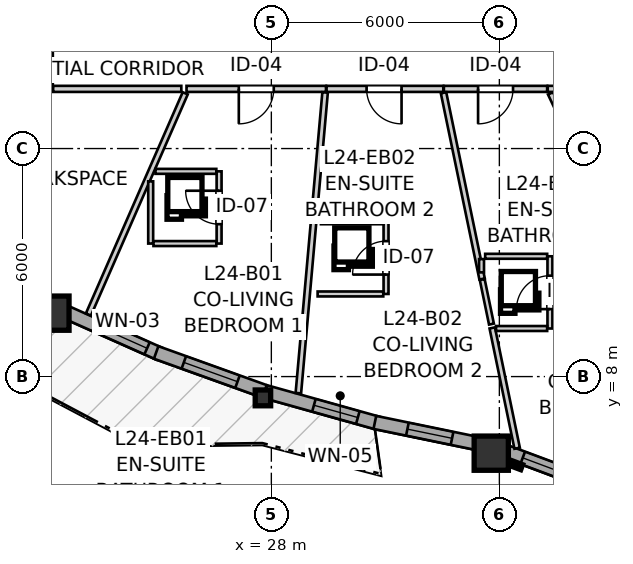
"""IFC4 building model, lengths in metres.
Left out: names, types, materials, properties, quantities, classifications, styles, units other than length and angle.
Written with IfcOpenShell. Run it as: python <this file> out.ifc"""

import sys

from ifc_helpers import new_model, si_unit, direction, frame, frame_2d, origin, origin_2d, place, context, subcontext, project, spatial, rectangle, i_section, extrude, source, transform, mapped, element, fill, save


model = new_model("IFC4")
c1 = context("Model", 3, precision=1e-05, world=origin(), true_north=direction((0.0, 1.0)))
c2 = subcontext(c1, "Body", "Model", "MODEL_VIEW")
j1 = project(units=[si_unit("LENGTHUNIT", "METRE"), si_unit("PLANEANGLEUNIT", "RADIAN")], contexts=[c1])
p1 = place(None, origin())
s1 = spatial("IfcSite", under=j1, at=p1, CompositionType="ELEMENT")
p2 = place(p1, origin())
s2 = spatial("IfcBuilding", under=s1, at=p2, CompositionType="ELEMENT")
p3 = place(p2, frame((0.0, 0.0, 83.2)))
s3 = spatial("IfcBuildingStorey", under=s2, at=p3, CompositionType="ELEMENT", Elevation=83.2)
m1 = source(origin(), c2, "Body", "SweptSolid", [
    extrude(rectangle(XDim=0.9, YDim=0.9, at=origin_2d()), origin(), (0.0, 0.0, 1.0), 2.935),
])
p4 = place(p3, frame((22.227, 9.669, 0.0), z_axis=(0.0, 0.0, 1.0), x_axis=(1.0, 0.0, 0.0)))
e1 = element("IfcColumn", 1, at=p4, inside=s3, PredefinedType="COLUMN", context=c2, shape_type="MappedRepresentation", body=[
    mapped(m1, transform((0.0, 0.0, 0.0), x_axis=(1.0, 0.0, 0.0), y_axis=(0.0, 1.0, 0.0), z_axis=(0.0, 0.0, 1.0), scale=1.0)),
])
m2 = source(origin(), c2, "Body", "SweptSolid", [
    extrude(i_section(OverallWidth=0.406, OverallDepth=0.416, WebThickness=0.027, FlangeThickness=0.044, FilletRadius=0.015, at=origin_2d()), origin(), (0.0, 0.0, 1.0), 2.935),
])
p5 = place(p3, frame((27.779, 7.439, 0.0), z_axis=(0.0, 0.0, 1.0), x_axis=(1.0, 0.0, 0.0)))
e2 = element("IfcColumn", 2, at=p5, inside=s3, PredefinedType="PILASTER", context=c2, shape_type="MappedRepresentation", body=[
    mapped(m2, transform((0.0, 0.0, 0.0), x_axis=(1.0, 0.0, 0.0), y_axis=(0.0, 1.0, 0.0), z_axis=(0.0, 0.0, 1.0), scale=1.0)),
])
p6 = place(p3, frame((33.787, 5.985, 0.0), z_axis=(0.0, 0.0, 1.0), x_axis=(1.0, 0.0, 0.0)))
e3 = element("IfcColumn", 3, at=p6, inside=s3, PredefinedType="COLUMN", context=c2, shape_type="MappedRepresentation", body=[
    mapped(m1, transform((0.0, 0.0, 0.0), x_axis=(1.0, 0.0, 0.0), y_axis=(0.0, 1.0, 0.0), z_axis=(0.0, 0.0, 1.0), scale=1.0)),
])
p7 = place(p3, frame((22.503, 9.737, 0.0), z_axis=(0.0, 0.0, 1.0), x_axis=(0.913443049169, -0.406966578388, 0.0)))
e4 = element("IfcWall", 4, at=p7, inside=s3, PredefinedType="SOLIDWALL", context=c2, shape_type="SweptSolid", body=[
    extrude(rectangle(XDim=2.79, YDim=0.35, at=frame_2d((1.395, 0.0))), origin(), (0.0, 0.0, 1.0), 2.465),
])
p8 = place(p7, frame((0.938, 0.0, 0.82)))
e5 = element("IfcOpeningElement", 5, at=p8, cuts=e4, PredefinedType="OPENING", context=c2, shape_type="SweptSolid", body=[
    extrude(rectangle(XDim=1.5, YDim=1.45, at=frame_2d((0.75, 0.725))), frame((0.0, 0.185, 0.0), z_axis=(0.0, -1.0, 0.0), x_axis=(1.0, 0.0, 0.0)), (0.0, 0.0, 1.0), 0.37),
])
p9 = place(p3, frame((24.969, 8.635, 0.0), z_axis=(0.0, 0.0, 1.0), x_axis=(0.941099972293, -0.338128440315, 0.0)))
e6 = element("IfcWall", 6, at=p9, inside=s3, PredefinedType="SOLIDWALL", context=c2, shape_type="SweptSolid", body=[
    extrude(rectangle(XDim=3.028, YDim=0.35, at=frame_2d((1.514, 0.0))), origin(), (0.0, 0.0, 1.0), 2.465),
])
p10 = place(p9, frame((0.774, 0.0, 0.82)))
e7 = element("IfcOpeningElement", 7, at=p10, cuts=e6, PredefinedType="OPENING", context=c2, shape_type="SweptSolid", body=[
    extrude(rectangle(XDim=1.5, YDim=1.45, at=frame_2d((0.75, 0.725))), frame((0.0, 0.185, 0.0), z_axis=(0.0, -1.0, 0.0), x_axis=(1.0, 0.0, 0.0)), (0.0, 0.0, 1.0), 0.37),
])
p11 = place(p3, frame((27.845, 7.603, 0.0), z_axis=(0.0, 0.0, 1.0), x_axis=(0.963041412051, -0.269353371382, 0.0)))
e8 = element("IfcWall", 8, at=p11, inside=s3, PredefinedType="SOLIDWALL", context=c2, shape_type="SweptSolid", body=[
    extrude(rectangle(XDim=3.078, YDim=0.35, at=frame_2d((1.539, 0.0))), origin(), (0.0, 0.0, 1.0), 2.465),
])
p12 = place(p11, frame((1.324, 0.0, 0.82)))
e9 = element("IfcOpeningElement", 9, at=p12, cuts=e8, PredefinedType="OPENING", context=c2, shape_type="SweptSolid", body=[
    extrude(rectangle(XDim=1.2, YDim=1.45, at=frame_2d((0.6, 0.725))), frame((0.0, 0.185, 0.0), z_axis=(0.0, -1.0, 0.0), x_axis=(1.0, 0.0, 0.0)), (0.0, 0.0, 1.0), 0.37),
])
p13 = place(p3, frame((30.724, 6.794, 0.0), z_axis=(0.0, 0.0, 1.0), x_axis=(0.979439663571, -0.201737317878, 0.0)))
e10 = element("IfcWall", 10, at=p13, inside=s3, PredefinedType="SOLIDWALL", context=c2, shape_type="SweptSolid", body=[
    extrude(rectangle(XDim=2.938, YDim=0.35, at=frame_2d((1.469, 0.0))), origin(), (0.0, 0.0, 1.0), 2.465),
])
p14 = place(p13, frame((0.874, 0.0, 0.82)))
e11 = element("IfcOpeningElement", 11, at=p14, cuts=e10, PredefinedType="OPENING", context=c2, shape_type="SweptSolid", body=[
    extrude(rectangle(XDim=1.2, YDim=1.45, at=frame_2d((0.6, 0.725))), frame((0.0, 0.185, 0.0), z_axis=(0.0, -1.0, 0.0), x_axis=(1.0, 0.0, 0.0)), (0.0, 0.0, 1.0), 0.37),
])
p15 = place(p3, frame((34.059, 6.07, 0.0), z_axis=(0.0, 0.0, 1.0), x_axis=(0.936803747811, -0.349855310219, 0.0)))
e12 = element("IfcWall", 12, at=p15, inside=s3, PredefinedType="SOLIDWALL", context=c2, shape_type="SweptSolid", body=[
    extrude(rectangle(XDim=1.836, YDim=0.35, at=frame_2d((0.918, 0.0))), origin(), (0.0, 0.0, 1.0), 2.465),
])
p16 = place(p15, frame((0.593, 0.0, 0.82)))
e13 = element("IfcOpeningElement", 13, at=p16, cuts=e12, PredefinedType="OPENING", context=c2, shape_type="SweptSolid", body=[
    extrude(rectangle(XDim=0.95, YDim=1.35, at=frame_2d((0.475, 0.675))), frame((0.0, 0.185, 0.0), z_axis=(0.0, -1.0, 0.0), x_axis=(1.0, 0.0, 0.0)), (0.0, 0.0, 1.0), 0.37),
])
p17 = place(p3, frame((22.17, 15.57, 0.0), z_axis=(0.0, 0.0, 1.0), x_axis=(0.0, 1.0, 0.0)))
e14 = element("IfcWall", 14, at=p17, inside=s3, PredefinedType="PARTITIONING", context=c2, shape_type="SweptSolid", body=[
    extrude(rectangle(XDim=5.543, YDim=0.16, at=frame_2d((2.771, 0.0))), origin(), (0.0, 0.0, 1.0), 2.935),
])
p18 = place(p17, frame((2.283, 0.0, 0.0)))
e15 = element("IfcOpeningElement", 15, at=p18, cuts=e14, PredefinedType="OPENING", context=c2, shape_type="SweptSolid", body=[
    extrude(rectangle(XDim=0.96, YDim=2.1, at=frame_2d((0.48, 1.05))), frame((0.0, 0.09, 0.0), z_axis=(0.0, -1.0, 0.0), x_axis=(1.0, 0.0, 0.0)), (0.0, 0.0, 1.0), 0.18),
])
p19 = place(p3, frame((29.438, 15.57, 0.0), z_axis=(0.0, 0.0, 1.0), x_axis=(-1.0, 0.0, 0.0)))
e16 = element("IfcWall", 16, at=p19, inside=s3, PredefinedType="PARTITIONING", context=c2, shape_type="SweptSolid", body=[
    extrude(rectangle(XDim=3.67, YDim=0.16, at=frame_2d((1.835, 0.0))), origin(), (0.0, 0.0, 1.0), 2.935),
])
p20 = place(p19, frame((1.374, 0.0, 0.0)))
e17 = element("IfcOpeningElement", 17, at=p20, cuts=e16, PredefinedType="OPENING", context=c2, shape_type="SweptSolid", body=[
    extrude(rectangle(XDim=0.92, YDim=2.1, at=frame_2d((0.46, 1.05))), frame((0.0, 0.09, 0.0), z_axis=(0.0, -1.0, 0.0), x_axis=(1.0, 0.0, 0.0)), (0.0, 0.0, 1.0), 0.18),
])
p21 = place(p3, frame((38.53, 15.57, 0.0), z_axis=(0.0, 0.0, 1.0), x_axis=(-1.0, 0.0, 0.0)))
e18 = element("IfcWall", 18, at=p21, inside=s3, PredefinedType="PARTITIONING", context=c2, shape_type="SweptSolid", body=[
    extrude(rectangle(XDim=3.257, YDim=0.16, at=frame_2d((1.628, 0.0))), origin(), (0.0, 0.0, 1.0), 2.935),
])
p22 = place(p21, frame((1.16, 0.0, 0.0)))
e19 = element("IfcOpeningElement", 19, at=p22, cuts=e18, PredefinedType="OPENING", context=c2, shape_type="SweptSolid", body=[
    extrude(rectangle(XDim=0.92, YDim=2.1, at=frame_2d((0.46, 1.05))), frame((0.0, 0.09, 0.0), z_axis=(0.0, -1.0, 0.0), x_axis=(1.0, 0.0, 0.0)), (0.0, 0.0, 1.0), 0.18),
])
p23 = place(p3, frame((32.525, 15.57, 0.0), z_axis=(0.0, 0.0, 1.0), x_axis=(-1.0, 0.0, 0.0)))
e20 = element("IfcWall", 20, at=p23, inside=s3, PredefinedType="PARTITIONING", context=c2, shape_type="SweptSolid", body=[
    extrude(rectangle(XDim=3.072, YDim=0.16, at=frame_2d((1.536, 0.0))), origin(), (0.0, 0.0, 1.0), 2.935),
])
p24 = place(p23, frame((1.098, 0.0, 0.0)))
e21 = element("IfcOpeningElement", 21, at=p24, cuts=e20, PredefinedType="OPENING", context=c2, shape_type="SweptSolid", body=[
    extrude(rectangle(XDim=0.92, YDim=2.1, at=frame_2d((0.46, 1.05))), frame((0.0, 0.09, 0.0), z_axis=(0.0, -1.0, 0.0), x_axis=(1.0, 0.0, 0.0)), (0.0, 0.0, 1.0), 0.18),
])
p25 = place(p3, frame((35.258, 15.57, 0.0), z_axis=(0.0, 0.0, 1.0), x_axis=(-1.0, 0.0, 0.0)))
e22 = element("IfcWall", 22, at=p25, inside=s3, PredefinedType="PARTITIONING", context=c2, shape_type="SweptSolid", body=[
    extrude(rectangle(XDim=2.718, YDim=0.16, at=frame_2d((1.359, 0.0))), origin(), (0.0, 0.0, 1.0), 2.935),
])
p26 = place(p25, frame((0.898, 0.0, 0.0)))
e23 = element("IfcOpeningElement", 23, at=p26, cuts=e22, PredefinedType="OPENING", context=c2, shape_type="SweptSolid", body=[
    extrude(rectangle(XDim=0.92, YDim=2.1, at=frame_2d((0.46, 1.05))), frame((0.0, 0.09, 0.0), z_axis=(0.0, -1.0, 0.0), x_axis=(1.0, 0.0, 0.0)), (0.0, 0.0, 1.0), 0.18),
])
p27 = place(p3, frame((26.625, 11.5, 0.0), z_axis=(0.0, 0.0, 1.0), x_axis=(0.0, 1.0, 0.0)))
e24 = element("IfcWall", 24, at=p27, inside=s3, PredefinedType="PARTITIONING", context=c2, shape_type="SweptSolid", body=[
    extrude(rectangle(XDim=1.9, YDim=0.13, at=frame_2d((0.95, 0.0))), origin(), (0.0, 0.0, 1.0), 2.935),
])
p28 = place(p27, frame((0.51, 0.0, 0.0)))
e25 = element("IfcOpeningElement", 25, at=p28, cuts=e24, PredefinedType="OPENING", context=c2, shape_type="SweptSolid", body=[
    extrude(rectangle(XDim=0.88, YDim=2.05, at=frame_2d((0.44, 1.025))), frame((0.0, 0.075, 0.0), z_axis=(0.0, -1.0, 0.0), x_axis=(1.0, 0.0, 0.0)), (0.0, 0.0, 1.0), 0.15),
])
p29 = place(p3, frame((31.018, 10.174, 0.0), z_axis=(0.0, 0.0, 1.0), x_axis=(0.0, 1.0, 0.0)))
e26 = element("IfcWall", 26, at=p29, inside=s3, PredefinedType="PARTITIONING", context=c2, shape_type="SweptSolid", body=[
    extrude(rectangle(XDim=1.9, YDim=0.13, at=frame_2d((0.95, 0.0))), origin(), (0.0, 0.0, 1.0), 2.935),
])
p30 = place(p29, frame((0.51, 0.0, 0.0)))
e27 = element("IfcOpeningElement", 27, at=p30, cuts=e26, PredefinedType="OPENING", context=c2, shape_type="SweptSolid", body=[
    extrude(rectangle(XDim=0.88, YDim=2.05, at=frame_2d((0.44, 1.025))), frame((0.0, 0.075, 0.0), z_axis=(0.0, -1.0, 0.0), x_axis=(1.0, 0.0, 0.0)), (0.0, 0.0, 1.0), 0.15),
])
p31 = place(p3, frame((35.331, 9.265, 0.0), z_axis=(0.0, 0.0, 1.0), x_axis=(0.0, 1.0, 0.0)))
e28 = element("IfcWall", 28, at=p31, inside=s3, PredefinedType="PARTITIONING", context=c2, shape_type="SweptSolid", body=[
    extrude(rectangle(XDim=1.9, YDim=0.13, at=frame_2d((0.95, 0.0))), origin(), (0.0, 0.0, 1.0), 2.935),
])
p32 = place(p31, frame((0.51, 0.0, 0.0)))
e29 = element("IfcOpeningElement", 29, at=p32, cuts=e28, PredefinedType="OPENING", context=c2, shape_type="SweptSolid", body=[
    extrude(rectangle(XDim=0.88, YDim=2.05, at=frame_2d((0.44, 1.025))), frame((0.0, 0.075, 0.0), z_axis=(0.0, -1.0, 0.0), x_axis=(1.0, 0.0, 0.0)), (0.0, 0.0, 1.0), 0.15),
])
p33 = place(p3, frame((28.711, 7.564, 0.0), z_axis=(0.0, 0.0, 1.0), x_axis=(0.088615013812, 0.996065951294, 0.0)))
e30 = element("IfcWall", 30, at=p33, inside=s3, PredefinedType="PARTITIONING", context=c2, shape_type="SweptSolid", body=[
    extrude(rectangle(XDim=7.943, YDim=0.145, at=frame_2d((3.971, 0.0))), origin(), (0.0, 0.0, 1.0), 2.935),
])
p34 = place(p3, frame((23.186, 9.634, 0.0), z_axis=(0.0, 0.0, 1.0), x_axis=(0.400994208685, 0.916080588486, 0.0)))
e31 = element("IfcWall", 31, at=p34, inside=s3, PredefinedType="PARTITIONING", context=c2, shape_type="SweptSolid", body=[
    extrude(rectangle(XDim=6.353, YDim=0.145, at=frame_2d((3.177, 0.0))), origin(), (0.0, 0.0, 1.0), 2.935),
])
p35 = place(p3, frame((32.531, 15.468, 0.0), z_axis=(0.0, 0.0, 1.0), x_axis=(0.202792769077, -0.979221677053, 0.0)))
e32 = element("IfcWall", 32, at=p35, inside=s3, PredefinedType="PARTITIONING", context=c2, shape_type="SweptSolid", body=[
    extrude(rectangle(XDim=5.003, YDim=0.145, at=frame_2d((2.502, 0.0))), origin(), (0.0, 0.0, 1.0), 2.935),
])
p36 = place(p3, frame((35.346, 15.452, 0.0), z_axis=(0.0, 0.0, 1.0), x_axis=(0.428023015228, -0.903767834366, 0.0)))
e33 = element("IfcWall", 33, at=p36, inside=s3, PredefinedType="PARTITIONING", context=c2, shape_type="SweptSolid", body=[
    extrude(rectangle(XDim=4.64, YDim=0.145, at=frame_2d((2.32, 0.0))), origin(), (0.0, 0.0, 1.0), 2.935),
])
p37 = place(p3, frame((22.258, 15.57, 0.0), z_axis=(0.0, 0.0, 1.0), x_axis=(1.0, 0.0, 0.0)))
e34 = element("IfcWall", 34, at=p37, inside=s3, PredefinedType="PARTITIONING", context=c2, shape_type="SweptSolid", body=[
    extrude(rectangle(XDim=3.373, YDim=0.16, at=frame_2d((1.687, 0.0))), origin(), (0.0, 0.0, 1.0), 2.935),
])
p38 = place(p3, frame((33.813, 9.28, 0.0), z_axis=(0.0, 0.0, 1.0), x_axis=(0.202648062782, -0.979251633979, 0.0)))
e35 = element("IfcWall", 35, at=p38, inside=s3, PredefinedType="PARTITIONING", context=c2, shape_type="SweptSolid", body=[
    extrude(rectangle(XDim=3.232, YDim=0.145, at=frame_2d((1.616, 0.0))), origin(), (0.0, 0.0, 1.0), 2.935),
])
p39 = place(p3, frame((24.825, 11.5, 0.0), z_axis=(0.0, 0.0, 1.0), x_axis=(0.0, 1.0, 0.0)))
e36 = element("IfcWall", 36, at=p39, inside=s3, PredefinedType="PARTITIONING", context=c2, shape_type="SweptSolid", body=[
    extrude(rectangle(XDim=1.637, YDim=0.13, at=frame_2d((0.818, 0.0))), origin(), (0.0, 0.0, 1.0), 2.935),
])
p40 = place(p3, frame((33.626, 11.165, 0.0), z_axis=(0.0, 0.0, 1.0), x_axis=(1.0, 0.0, 0.0)))
e37 = element("IfcWall", 37, at=p40, inside=s3, PredefinedType="PARTITIONING", context=c2, shape_type="SweptSolid", body=[
    extrude(rectangle(XDim=1.632, YDim=0.13, at=frame_2d((0.816, 0.0))), origin(), (0.0, 0.0, 1.0), 2.935),
])
p41 = place(p3, frame((24.898, 11.5, 0.0), z_axis=(0.0, 0.0, 1.0), x_axis=(1.0, 0.0, 0.0)))
e38 = element("IfcWall", 38, at=p41, inside=s3, PredefinedType="PARTITIONING", context=c2, shape_type="SweptSolid", body=[
    extrude(rectangle(XDim=1.654, YDim=0.13, at=frame_2d((0.827, 0.0))), origin(), (0.0, 0.0, 1.0), 2.543),
])
p42 = place(p3, frame((29.305, 12.074, 0.0), z_axis=(0.0, 0.0, 1.0), x_axis=(1.0, 0.0, 0.0)))
e39 = element("IfcWall", 39, at=p42, inside=s3, PredefinedType="PARTITIONING", context=c2, shape_type="SweptSolid", body=[
    extrude(rectangle(XDim=1.64, YDim=0.13, at=frame_2d((0.82, 0.0))), origin(), (0.0, 0.0, 1.0), 2.935),
])
p43 = place(p3, frame((29.218, 10.174, 0.0), z_axis=(0.0, 0.0, 1.0), x_axis=(1.0, 0.0, 0.0)))
e40 = element("IfcWall", 40, at=p43, inside=s3, PredefinedType="PARTITIONING", context=c2, shape_type="SweptSolid", body=[
    extrude(rectangle(XDim=1.727, YDim=0.13, at=frame_2d((0.864, 0.0))), origin(), (0.0, 0.0, 1.0), 2.543),
])
p44 = place(p3, frame((24.951, 13.4, 0.0), z_axis=(0.0, 0.0, 1.0), x_axis=(1.0, 0.0, 0.0)))
e41 = element("IfcWall", 41, at=p44, inside=s3, PredefinedType="PARTITIONING", context=c2, shape_type="SweptSolid", body=[
    extrude(rectangle(XDim=1.601, YDim=0.13, at=frame_2d((0.801, 0.0))), origin(), (0.0, 0.0, 1.0), 2.935),
])
p45 = place(p3, frame((33.912, 9.265, 0.0), z_axis=(0.0, 0.0, 1.0), x_axis=(1.0, 0.0, 0.0)))
e42 = element("IfcWall", 42, at=p45, inside=s3, PredefinedType="PARTITIONING", context=c2, shape_type="SweptSolid", body=[
    extrude(rectangle(XDim=1.346, YDim=0.13, at=frame_2d((0.673, 0.0))), origin(), (0.0, 0.0, 1.0), 2.935),
])
p46 = place(p3, frame((33.549, 10.553, 0.0), z_axis=(0.0, 0.0, 1.0), x_axis=(0.202855035592, -0.97920877985, 0.0)))
e43 = element("IfcWall", 43, at=p46, inside=s3, PredefinedType="PARTITIONING", context=c2, shape_type="SweptSolid", body=[
    extrude(rectangle(XDim=1.198, YDim=0.13, at=frame_2d((0.599, 0.0))), origin(), (0.0, 0.0, 1.0), 2.935),
])
p47 = place(p3, frame((33.531, 10.742, 0.0), z_axis=(0.0, 0.0, 1.0), x_axis=(0.0, 1.0, 0.0)))
e44 = element("IfcWall", 44, at=p47, inside=s3, PredefinedType="PARTITIONING", context=c2, shape_type="SweptSolid", body=[
    extrude(rectangle(XDim=0.35, YDim=0.13, at=frame_2d((0.175, 0.0))), origin(), (0.0, 0.0, 1.0), 2.935),
])
m3 = source(origin(), c2, "Body", "SweptSolid", [
    extrude(rectangle(XDim=1.5, YDim=1.45, at=frame_2d((0.75, 0.725))), frame((0.0, 0.03, 0.0), z_axis=(0.0, -1.0, 0.0), x_axis=(1.0, 0.0, 0.0)), (0.0, 0.0, 1.0), 0.06),
])
p48 = place(p8, origin())
e45 = element("IfcWindow", 45, at=p48, inside=s3, PartitioningType="SINGLE_PANEL", PredefinedType="WINDOW", context=c2, shape_type="MappedRepresentation", body=[
    mapped(m3, transform((0.0, 0.0, 0.0), x_axis=(1.0, 0.0, 0.0), y_axis=(0.0, 1.0, 0.0), z_axis=(0.0, 0.0, 1.0), scale=1.0)),
])
fill(e5, e45)
p49 = place(p10, origin())
e46 = element("IfcWindow", 46, at=p49, inside=s3, PartitioningType="SINGLE_PANEL", PredefinedType="WINDOW", context=c2, shape_type="MappedRepresentation", body=[
    mapped(m3, transform((0.0, 0.0, 0.0), x_axis=(1.0, 0.0, 0.0), y_axis=(0.0, 1.0, 0.0), z_axis=(0.0, 0.0, 1.0), scale=1.0)),
])
fill(e7, e46)
m4 = source(origin(), c2, "Body", "SweptSolid", [
    extrude(rectangle(XDim=1.2, YDim=1.45, at=frame_2d((0.6, 0.725))), frame((0.0, 0.03, 0.0), z_axis=(0.0, -1.0, 0.0), x_axis=(1.0, 0.0, 0.0)), (0.0, 0.0, 1.0), 0.06),
])
p50 = place(p12, origin())
e47 = element("IfcWindow", 47, at=p50, inside=s3, PartitioningType="SINGLE_PANEL", PredefinedType="WINDOW", context=c2, shape_type="MappedRepresentation", body=[
    mapped(m4, transform((0.0, 0.0, 0.0), x_axis=(1.0, 0.0, 0.0), y_axis=(0.0, 1.0, 0.0), z_axis=(0.0, 0.0, 1.0), scale=1.0)),
])
fill(e9, e47)
p51 = place(p14, origin())
e48 = element("IfcWindow", 48, at=p51, inside=s3, PartitioningType="SINGLE_PANEL", PredefinedType="WINDOW", context=c2, shape_type="MappedRepresentation", body=[
    mapped(m4, transform((0.0, 0.0, 0.0), x_axis=(1.0, 0.0, 0.0), y_axis=(0.0, 1.0, 0.0), z_axis=(0.0, 0.0, 1.0), scale=1.0)),
])
fill(e11, e48)
m5 = source(origin(), c2, "Body", "SweptSolid", [
    extrude(rectangle(XDim=0.95, YDim=1.35, at=frame_2d((0.475, 0.675))), frame((0.0, 0.03, 0.0), z_axis=(0.0, -1.0, 0.0), x_axis=(1.0, 0.0, 0.0)), (0.0, 0.0, 1.0), 0.06),
])
p52 = place(p16, origin())
e49 = element("IfcWindow", 49, at=p52, inside=s3, PartitioningType="SINGLE_PANEL", PredefinedType="WINDOW", context=c2, shape_type="MappedRepresentation", body=[
    mapped(m5, transform((0.0, 0.0, 0.0), x_axis=(1.0, 0.0, 0.0), y_axis=(0.0, 1.0, 0.0), z_axis=(0.0, 0.0, 1.0), scale=1.0)),
])
fill(e13, e49)
m6 = source(origin(), c2, "Body", "SweptSolid", [
    extrude(rectangle(XDim=0.92, YDim=2.1, at=frame_2d((0.46, 1.05))), frame((0.0, 0.025, 0.0), z_axis=(0.0, -1.0, 0.0), x_axis=(1.0, 0.0, 0.0)), (0.0, 0.0, 1.0), 0.05),
])
p53 = place(p20, origin())
e50 = element("IfcDoor", 50, at=p53, inside=s3, OperationType="SINGLE_SWING_RIGHT", PredefinedType="DOOR", context=c2, shape_type="MappedRepresentation", body=[
    mapped(m6, transform((0.0, 0.0, 0.0), x_axis=(1.0, 0.0, 0.0), y_axis=(0.0, 1.0, 0.0), z_axis=(0.0, 0.0, 1.0), scale=1.0)),
])
fill(e17, e50)
p54 = place(p24, origin())
e51 = element("IfcDoor", 51, at=p54, inside=s3, OperationType="SINGLE_SWING_LEFT", PredefinedType="DOOR", context=c2, shape_type="MappedRepresentation", body=[
    mapped(m6, transform((0.0, 0.0, 0.0), x_axis=(1.0, 0.0, 0.0), y_axis=(0.0, 1.0, 0.0), z_axis=(0.0, 0.0, 1.0), scale=1.0)),
])
fill(e21, e51)
p55 = place(p26, origin())
e52 = element("IfcDoor", 52, at=p55, inside=s3, OperationType="SINGLE_SWING_RIGHT", PredefinedType="DOOR", context=c2, shape_type="MappedRepresentation", body=[
    mapped(m6, transform((0.0, 0.0, 0.0), x_axis=(1.0, 0.0, 0.0), y_axis=(0.0, 1.0, 0.0), z_axis=(0.0, 0.0, 1.0), scale=1.0)),
])
fill(e23, e52)
m7 = source(origin(), c2, "Body", "SweptSolid", [
    extrude(rectangle(XDim=0.88, YDim=2.05, at=frame_2d((0.44, 1.025))), frame((0.0, 0.025, 0.0), z_axis=(0.0, -1.0, 0.0), x_axis=(1.0, 0.0, 0.0)), (0.0, 0.0, 1.0), 0.05),
])
p56 = place(p28, origin())
e53 = element("IfcDoor", 53, at=p56, inside=s3, OperationType="SINGLE_SWING_RIGHT", PredefinedType="DOOR", context=c2, shape_type="MappedRepresentation", body=[
    mapped(m7, transform((0.0, 0.0, 0.0), x_axis=(1.0, 0.0, 0.0), y_axis=(0.0, 1.0, 0.0), z_axis=(0.0, 0.0, 1.0), scale=1.0)),
])
fill(e25, e53)
p57 = place(p30, origin())
e54 = element("IfcDoor", 54, at=p57, inside=s3, OperationType="SINGLE_SWING_LEFT", PredefinedType="DOOR", context=c2, shape_type="MappedRepresentation", body=[
    mapped(m7, transform((0.0, 0.0, 0.0), x_axis=(1.0, 0.0, 0.0), y_axis=(0.0, 1.0, 0.0), z_axis=(0.0, 0.0, 1.0), scale=1.0)),
])
fill(e27, e54)
p58 = place(p32, origin())
e55 = element("IfcDoor", 55, at=p58, inside=s3, OperationType="SINGLE_SWING_LEFT", PredefinedType="DOOR", context=c2, shape_type="MappedRepresentation", body=[
    mapped(m7, transform((0.0, 0.0, 0.0), x_axis=(1.0, 0.0, 0.0), y_axis=(0.0, 1.0, 0.0), z_axis=(0.0, 0.0, 1.0), scale=1.0)),
])
fill(e29, e55)
save(model, sys.argv[1])
